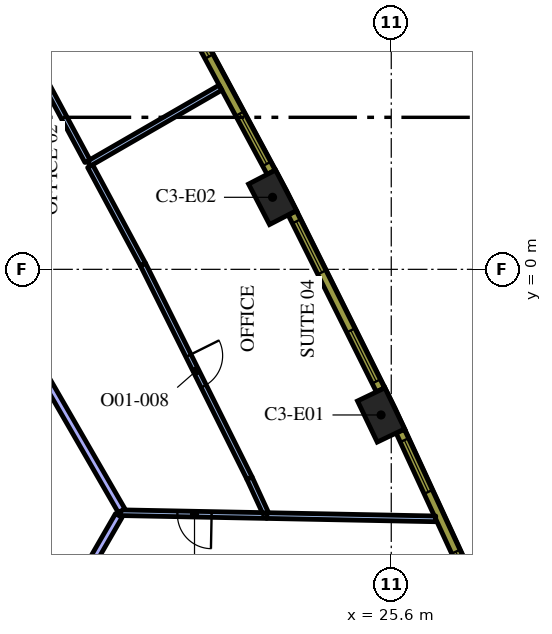
"""IFC4 building model, lengths in metres.
Left out: names, types, materials, properties, quantities, classifications, styles, units other than length and angle.
Written with IfcOpenShell. Run it as: python <this file> out.ifc"""

import sys

from ifc_helpers import new_model, si_unit, direction, frame, frame_2d, origin, origin_2d, place, context, subcontext, project, spatial, rectangle, extrude, element, fill, save


model = new_model("IFC4")
c1 = context("Model", 3, precision=1e-05, world=origin(), true_north=direction((0.0, 1.0)))
c2 = subcontext(c1, "Body", "Model", "MODEL_VIEW")
j1 = project(units=[si_unit("LENGTHUNIT", "METRE"), si_unit("PLANEANGLEUNIT", "RADIAN")], contexts=[c1])
p1 = place(None, origin())
s1 = spatial("IfcSite", under=j1, at=p1, CompositionType="ELEMENT")
p2 = place(p1, origin())
s2 = spatial("IfcBuilding", under=s1, at=p2, CompositionType="ELEMENT")
p3 = place(p2, frame((0.0, 0.0, 141.6)))
s3 = spatial("IfcBuildingStorey", under=s2, at=p3, CompositionType="ELEMENT", Elevation=141.6)
for number, where, z_axis, x_axis in (
    (1, (25.332, -3.832, 0.0), (0.0, 0.0, 1.0), (-0.433, 0.902, 0.0)),
    (2, (22.476, 1.896, 0.0), (0.0, 0.0, 1.0), (-0.46, 0.888, 0.0)),
):
    element("IfcColumn", number, at=place(p3, frame(where, z_axis=z_axis, x_axis=x_axis)), inside=s3, PredefinedType="COLUMN", context=c2, shape_type="SweptSolid", body=[
        extrude(rectangle(XDim=1.2, YDim=0.8, at=origin_2d()), origin(), (0.0, 0.0, 1.0), 4.2),
    ])
p4 = place(p3, frame((22.32, -6.479, 0.0), z_axis=(0.0, 0.0, 1.0), x_axis=(0.999809252738, -0.019530953357, 0.0)))
e3 = element("IfcWall", 3, at=p4, inside=s3, PredefinedType="PARTITIONING", context=c2, shape_type="SweptSolid", body=[
    extrude(rectangle(XDim=4.45, YDim=0.15, at=frame_2d((2.225, 0.0))), origin(), (0.0, 0.0, 1.0), 3.15),
])
p5 = place(p3, frame((22.328, -6.479, 0.0), z_axis=(0.0, 0.0, 1.0), x_axis=(-0.999809811932, 0.019502306655, 0.0)))
e4 = element("IfcWall", 4, at=p5, inside=s3, PredefinedType="PARTITIONING", context=c2, shape_type="SweptSolid", body=[
    extrude(rectangle(XDim=3.856, YDim=0.15, at=frame_2d((1.928, 0.0))), origin(), (0.0, 0.0, 1.0), 3.15),
])
p6 = place(p5, frame((1.456, 0.0, 0.0)))
e5 = element("IfcOpeningElement", 5, at=p6, cuts=e4, PredefinedType="OPENING", context=c2, shape_type="SweptSolid", body=[
    extrude(rectangle(XDim=0.9, YDim=2.1, at=frame_2d((0.45, 1.05))), frame((0.0, 0.085, 0.0), z_axis=(0.0, -1.0, 0.0), x_axis=(1.0, 0.0, 0.0)), (0.0, 0.0, 1.0), 0.17),
])
p7 = place(p3, frame((16.678, -9.513, 0.0), z_axis=(0.0, 0.0, 1.0), x_axis=(0.500011844827, 0.866018565062, 0.0)))
e6 = element("IfcWall", 6, at=p7, inside=s3, PredefinedType="PARTITIONING", context=c2, shape_type="SweptSolid", body=[
    extrude(rectangle(XDim=3.505, YDim=0.2, at=frame_2d((1.753, 0.0))), origin(), (0.0, 0.0, 1.0), 3.15),
])
p8 = place(p3, frame((17.641, 2.781, 0.0), z_axis=(0.0, 0.0, 1.0), x_axis=(0.866053520969, 0.499951296445, 0.0)))
e7 = element("IfcWall", 7, at=p8, inside=s3, PredefinedType="PARTITIONING", context=c2, shape_type="SweptSolid", body=[
    extrude(rectangle(XDim=4.002, YDim=0.15, at=frame_2d((2.001, 0.0))), origin(), (0.0, 0.0, 1.0), 3.15),
])
p9 = place(p3, frame((22.289, -6.403, 0.0), z_axis=(0.0, 0.0, 1.0), x_axis=(-0.41893460807, 0.908016406328, 0.0)))
e8 = element("IfcWall", 8, at=p9, inside=s3, PredefinedType="PARTITIONING", context=c2, shape_type="SweptSolid", body=[
    extrude(rectangle(XDim=1.002, YDim=0.15, at=frame_2d((0.501, 0.0))), origin(), (0.0, 0.0, 1.0), 3.15),
])
p10 = place(p3, frame((19.066, 0.129, 0.0), z_axis=(0.0, 0.0, 1.0), x_axis=(0.446202922071, -0.89493181435, 0.0)))
e9 = element("IfcWall", 9, at=p10, inside=s3, PredefinedType="PARTITIONING", context=c2, shape_type="SweptSolid", body=[
    extrude(rectangle(XDim=6.282, YDim=0.15, at=frame_2d((3.141, 0.0))), origin(), (0.0, 0.0, 1.0), 3.15),
])
p11 = place(p10, frame((2.683, 0.0, 0.0)))
e10 = element("IfcOpeningElement", 10, at=p11, cuts=e9, PredefinedType="OPENING", context=c2, shape_type="SweptSolid", body=[
    extrude(rectangle(XDim=0.9, YDim=2.1, at=frame_2d((0.45, 1.05))), frame((0.0, 0.085, 0.0), z_axis=(0.0, -1.0, 0.0), x_axis=(1.0, 0.0, 0.0)), (0.0, 0.0, 1.0), 0.17),
])
p12 = place(p3, frame((19.066, 0.129, 0.0), z_axis=(0.0, 0.0, 1.0), x_axis=(-0.473335829303, 0.880882053795, 0.0)))
e11 = element("IfcWall", 11, at=p12, inside=s3, PredefinedType="PARTITIONING", context=c2, shape_type="SweptSolid", body=[
    extrude(rectangle(XDim=2.935, YDim=0.15, at=frame_2d((1.468, 0.0))), origin(), (0.0, 0.0, 1.0), 3.15),
])
p13 = place(p3, frame((17.606, 2.847, 0.0), z_axis=(0.0, 0.0, 1.0), x_axis=(-0.473348321673, 0.880875340993, 0.0)))
e12 = element("IfcWall", 12, at=p13, inside=s3, PredefinedType="PARTITIONING", context=c2, shape_type="SweptSolid", body=[
    extrude(rectangle(XDim=3.197, YDim=0.15, at=frame_2d((1.599, 0.0))), origin(), (0.0, 0.0, 1.0), 3.15),
])
p14 = place(p3, frame((18.504, -6.35, 0.0), z_axis=(0.0, 0.0, 1.0), x_axis=(-0.499995029582, 0.866028273438, 0.0)))
e13 = element("IfcWall", 13, at=p14, inside=s3, PredefinedType="PARTITIONING", context=c2, shape_type="SweptSolid", body=[
    extrude(rectangle(XDim=9.717, YDim=0.2, at=frame_2d((4.859, 0.0))), origin(), (0.0, 0.0, 1.0), 3.15),
])
p15 = place(p3, frame((28.02, -8.992, 0.0), z_axis=(0.0, 0.0, 1.0), x_axis=(-0.418722559465, 0.908114209885, 0.0)))
e14 = element("IfcWall", 14, at=p15, inside=s3, PredefinedType="SOLIDWALL", context=c2, shape_type="SweptSolid", body=[
    extrude(rectangle(XDim=5.213, YDim=0.24, at=frame_2d((2.606, 0.0))), origin(), (0.0, 0.0, 1.0), 3.95),
])
p16 = place(p15, frame((0.221, 0.0, 0.9)))
e15 = element("IfcOpeningElement", 15, at=p16, cuts=e14, PredefinedType="OPENING", context=c2, shape_type="SweptSolid", body=[
    extrude(rectangle(XDim=1.5, YDim=2.55, at=frame_2d((0.75, 1.275))), frame((0.0, 0.13, 0.0), z_axis=(0.0, -1.0, 0.0), x_axis=(1.0, 0.0, 0.0)), (0.0, 0.0, 1.0), 0.26),
])
p17 = place(p15, frame((3.452, 0.0, 0.9)))
e16 = element("IfcOpeningElement", 16, at=p17, cuts=e14, PredefinedType="OPENING", context=c2, shape_type="SweptSolid", body=[
    extrude(rectangle(XDim=1.5, YDim=2.55, at=frame_2d((0.75, 1.275))), frame((0.0, 0.13, 0.0), z_axis=(0.0, -1.0, 0.0), x_axis=(1.0, 0.0, 0.0)), (0.0, 0.0, 1.0), 0.26),
])
p18 = place(p3, frame((25.316, -3.171, 0.0), z_axis=(0.0, 0.0, 1.0), x_axis=(-0.446256171312, 0.8949052629, 0.0)))
e17 = element("IfcWall", 17, at=p18, inside=s3, PredefinedType="SOLIDWALL", context=c2, shape_type="SweptSolid", body=[
    extrude(rectangle(XDim=5.203, YDim=0.24, at=frame_2d((2.602, 0.0))), origin(), (0.0, 0.0, 1.0), 3.95),
])
p19 = place(p18, frame((0.248, 0.0, 0.9)))
e18 = element("IfcOpeningElement", 18, at=p19, cuts=e17, PredefinedType="OPENING", context=c2, shape_type="SweptSolid", body=[
    extrude(rectangle(XDim=1.5, YDim=2.55, at=frame_2d((0.75, 1.275))), frame((0.0, 0.13, 0.0), z_axis=(0.0, -1.0, 0.0), x_axis=(1.0, 0.0, 0.0)), (0.0, 0.0, 1.0), 0.26),
])
p20 = place(p18, frame((3.455, 0.0, 0.9)))
e19 = element("IfcOpeningElement", 19, at=p20, cuts=e17, PredefinedType="OPENING", context=c2, shape_type="SweptSolid", body=[
    extrude(rectangle(XDim=1.5, YDim=2.55, at=frame_2d((0.75, 1.275))), frame((0.0, 0.13, 0.0), z_axis=(0.0, -1.0, 0.0), x_axis=(1.0, 0.0, 0.0)), (0.0, 0.0, 1.0), 0.26),
])
p21 = place(p3, frame((22.44, 2.555, 0.0), z_axis=(0.0, 0.0, 1.0), x_axis=(-0.473349833294, 0.880874528704, 0.0)))
e20 = element("IfcWall", 20, at=p21, inside=s3, PredefinedType="SOLIDWALL", context=c2, shape_type="SweptSolid", body=[
    extrude(rectangle(XDim=5.204, YDim=0.24, at=frame_2d((2.602, 0.0))), origin(), (0.0, 0.0, 1.0), 3.95),
])
p22 = place(p21, frame((0.248, 0.0, 0.9)))
e21 = element("IfcOpeningElement", 21, at=p22, cuts=e20, PredefinedType="OPENING", context=c2, shape_type="SweptSolid", body=[
    extrude(rectangle(XDim=1.5, YDim=2.55, at=frame_2d((0.75, 1.275))), frame((0.0, 0.13, 0.0), z_axis=(0.0, -1.0, 0.0), x_axis=(1.0, 0.0, 0.0)), (0.0, 0.0, 1.0), 0.26),
])
p23 = place(p21, frame((3.455, 0.0, 0.9)))
e22 = element("IfcOpeningElement", 22, at=p23, cuts=e20, PredefinedType="OPENING", context=c2, shape_type="SweptSolid", body=[
    extrude(rectangle(XDim=1.5, YDim=2.55, at=frame_2d((0.75, 1.275))), frame((0.0, 0.13, 0.0), z_axis=(0.0, -1.0, 0.0), x_axis=(1.0, 0.0, 0.0)), (0.0, 0.0, 1.0), 0.26),
])
p24 = place(p6, origin())
e23 = element("IfcDoor", 23, at=p24, inside=s3, OperationType="SINGLE_SWING_LEFT", PredefinedType="DOOR", context=c2, shape_type="SweptSolid", body=[
    extrude(rectangle(XDim=0.9, YDim=2.1, at=frame_2d((0.45, 1.05))), frame((0.0, 0.025, 0.0), z_axis=(0.0, -1.0, 0.0), x_axis=(1.0, 0.0, 0.0)), (0.0, 0.0, 1.0), 0.05),
])
fill(e5, e23)
p25 = place(p11, origin())
e24 = element("IfcDoor", 24, at=p25, inside=s3, OperationType="SINGLE_SWING_LEFT", PredefinedType="DOOR", context=c2, shape_type="SweptSolid", body=[
    extrude(rectangle(XDim=0.9, YDim=2.1, at=frame_2d((0.45, 1.05))), frame((0.0, 0.025, 0.0), z_axis=(0.0, -1.0, 0.0), x_axis=(1.0, 0.0, 0.0)), (0.0, 0.0, 1.0), 0.05),
])
fill(e10, e24)
p26 = place(p16, origin())
e25 = element("IfcWindow", 25, at=p26, inside=s3, PartitioningType="SINGLE_PANEL", PredefinedType="WINDOW", context=c2, shape_type="SweptSolid", body=[
    extrude(rectangle(XDim=1.5, YDim=2.55, at=frame_2d((0.75, 1.275))), frame((0.0, 0.04, 0.0), z_axis=(0.0, -1.0, 0.0), x_axis=(1.0, 0.0, 0.0)), (0.0, 0.0, 1.0), 0.06),
])
fill(e15, e25)
p27 = place(p17, origin())
e26 = element("IfcWindow", 26, at=p27, inside=s3, PartitioningType="SINGLE_PANEL", PredefinedType="WINDOW", context=c2, shape_type="SweptSolid", body=[
    extrude(rectangle(XDim=1.5, YDim=2.55, at=frame_2d((0.75, 1.275))), frame((0.0, 0.04, 0.0), z_axis=(0.0, -1.0, 0.0), x_axis=(1.0, 0.0, 0.0)), (0.0, 0.0, 1.0), 0.06),
])
fill(e16, e26)
p28 = place(p19, origin())
e27 = element("IfcWindow", 27, at=p28, inside=s3, PartitioningType="SINGLE_PANEL", PredefinedType="WINDOW", context=c2, shape_type="SweptSolid", body=[
    extrude(rectangle(XDim=1.5, YDim=2.55, at=frame_2d((0.75, 1.275))), frame((0.0, 0.04, 0.0), z_axis=(0.0, -1.0, 0.0), x_axis=(1.0, 0.0, 0.0)), (0.0, 0.0, 1.0), 0.06),
])
fill(e18, e27)
p29 = place(p20, origin())
e28 = element("IfcWindow", 28, at=p29, inside=s3, PartitioningType="SINGLE_PANEL", PredefinedType="WINDOW", context=c2, shape_type="SweptSolid", body=[
    extrude(rectangle(XDim=1.5, YDim=2.55, at=frame_2d((0.75, 1.275))), frame((0.0, 0.04, 0.0), z_axis=(0.0, -1.0, 0.0), x_axis=(1.0, 0.0, 0.0)), (0.0, 0.0, 1.0), 0.06),
])
fill(e19, e28)
p30 = place(p22, origin())
e29 = element("IfcWindow", 29, at=p30, inside=s3, PartitioningType="SINGLE_PANEL", PredefinedType="WINDOW", context=c2, shape_type="SweptSolid", body=[
    extrude(rectangle(XDim=1.5, YDim=2.55, at=frame_2d((0.75, 1.275))), frame((0.0, 0.04, 0.0), z_axis=(0.0, -1.0, 0.0), x_axis=(1.0, 0.0, 0.0)), (0.0, 0.0, 1.0), 0.06),
])
fill(e21, e29)
p31 = place(p23, origin())
e30 = element("IfcWindow", 30, at=p31, inside=s3, PartitioningType="SINGLE_PANEL", PredefinedType="WINDOW", context=c2, shape_type="SweptSolid", body=[
    extrude(rectangle(XDim=1.5, YDim=2.55, at=frame_2d((0.75, 1.275))), frame((0.0, 0.04, 0.0), z_axis=(0.0, -1.0, 0.0), x_axis=(1.0, 0.0, 0.0)), (0.0, 0.0, 1.0), 0.06),
])
fill(e22, e30)
save(model, sys.argv[1])
